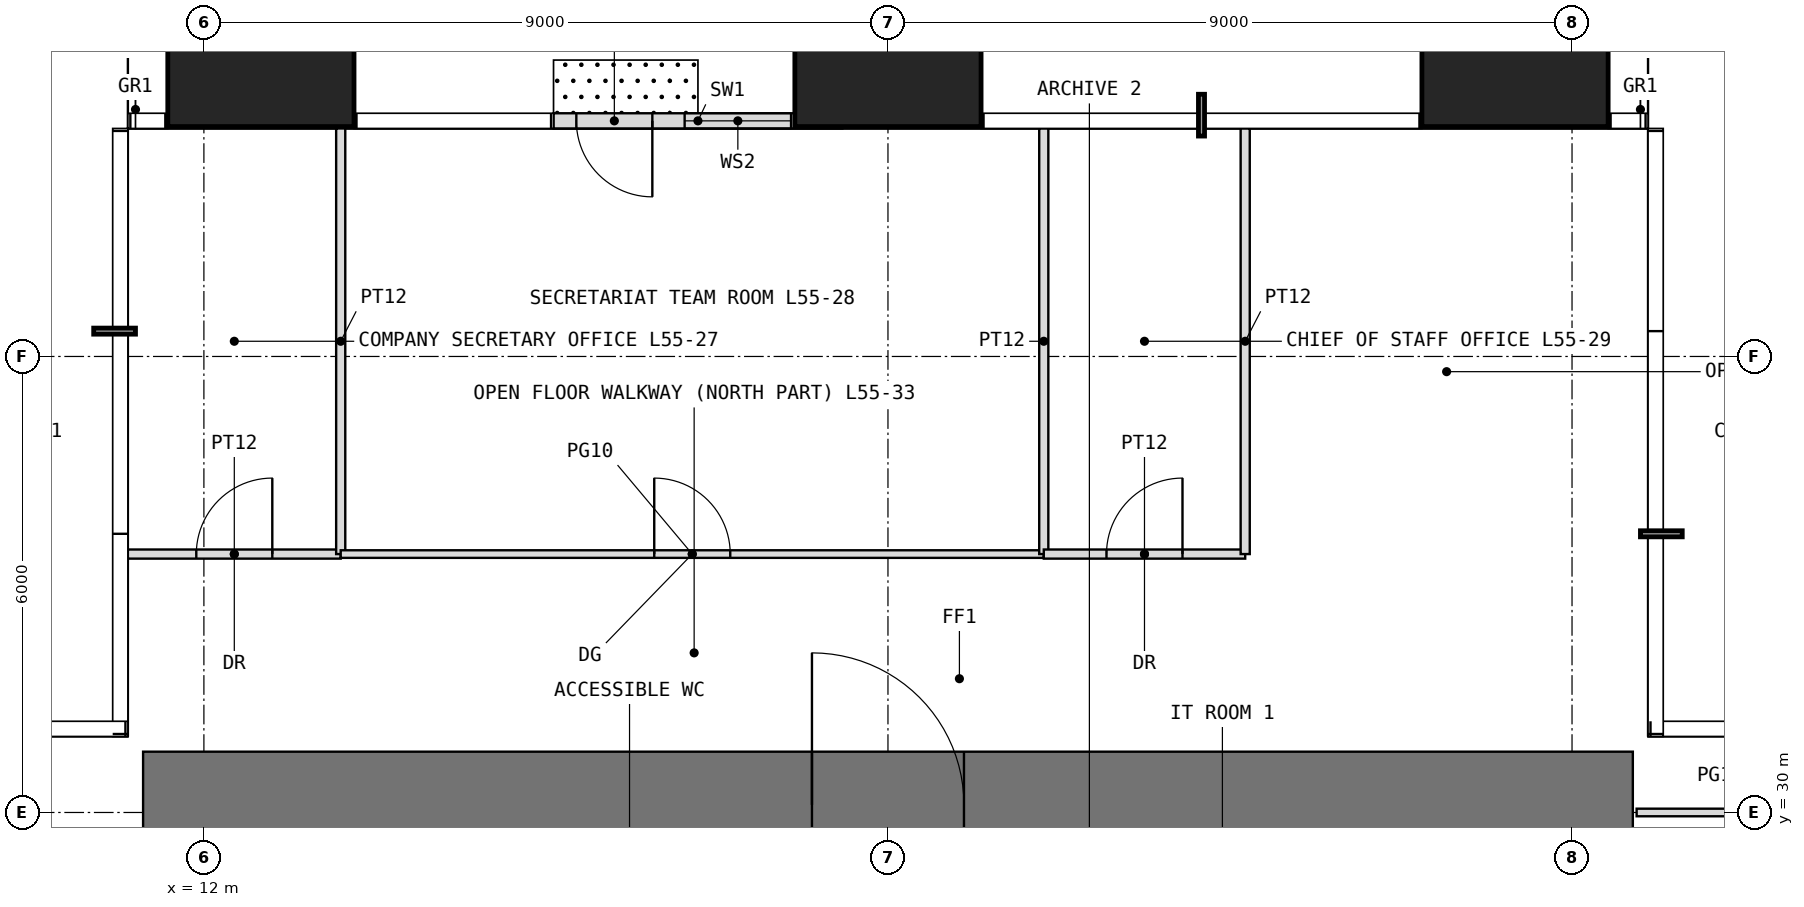
"""IFC4 building model, lengths in metres.
Left out: names, types, materials, properties, quantities, classifications, styles, units other than length and angle.
Written with IfcOpenShell. Run it as: python <this file> out.ifc"""

import sys

from ifc_helpers import new_model, si_unit, direction, frame, frame_2d, origin, origin_2d, place, context, subcontext, project, spatial, rectangle, extrude, element, fill, save


model = new_model("IFC4")
c1 = context("Model", 3, precision=1e-05, world=origin(), true_north=direction((0.0, 1.0)))
c2 = subcontext(c1, "Body", "Model", "MODEL_VIEW")
j1 = project(units=[si_unit("LENGTHUNIT", "METRE"), si_unit("PLANEANGLEUNIT", "RADIAN")], contexts=[c1])
p1 = place(None, origin())
s1 = spatial("IfcSite", under=j1, at=p1, CompositionType="ELEMENT")
p2 = place(p1, origin())
s2 = spatial("IfcBuilding", under=s1, at=p2, CompositionType="ELEMENT")
p3 = place(p2, frame((0.0, 0.0, 230.5)))
s3 = spatial("IfcBuildingStorey", under=s2, at=p3, CompositionType="ELEMENT", Elevation=230.5)
for number, where, z_axis, x_axis in (
    (1, (12.75, 40.25, 0.0), (0.0, 0.0, 1.0), (1.0, 0.0, 0.0)),
    (2, (21.0, 40.25, 0.0), (0.0, 0.0, 1.0), (1.0, 0.0, 0.0)),
    (3, (29.25, 40.25, 0.0), (0.0, 0.0, 1.0), (1.0, 0.0, 0.0)),
):
    element("IfcColumn", number, at=place(p3, frame(where, z_axis=z_axis, x_axis=x_axis)), inside=s3, PredefinedType="COLUMN", context=c2, shape_type="SweptSolid", body=[
        extrude(rectangle(XDim=2.45, YDim=2.45, at=origin_2d()), origin(), (0.0, 0.0, 1.0), 4.0),
    ])
p4 = place(p3, frame((20.4, 39.1, 0.0), z_axis=(0.0, 0.0, 1.0), x_axis=(-1.0, 0.0, 0.0)))
e4 = element("IfcWall", 4, at=p4, inside=s3, PredefinedType="USERDEFINED", context=c2, shape_type="SweptSolid", body=[
    extrude(rectangle(XDim=3.8, YDim=0.2, at=frame_2d((1.9, 0.0))), origin(), (0.0, 0.0, 1.0), 3.55),
])
p5 = place(p4, frame((2.5, 0.0, 0.0)))
e5 = element("IfcOpeningElement", 5, at=p5, cuts=e4, PredefinedType="OPENING", context=c2, shape_type="SweptSolid", body=[
    extrude(rectangle(XDim=1.0, YDim=2.4, at=frame_2d((0.5, 1.2))), frame((0.0, 0.11, 0.0), z_axis=(0.0, -1.0, 0.0), x_axis=(1.0, 0.0, 0.0)), (0.0, 0.0, 1.0), 0.22),
])
p6 = place(p4, frame((0.675, 0.0, 0.3)))
e6 = element("IfcOpeningElement", 6, at=p6, cuts=e4, PredefinedType="OPENING", context=c2, shape_type="SweptSolid", body=[
    extrude(rectangle(XDim=1.4, YDim=2.7, at=frame_2d((0.7, 1.35))), frame((0.0, 0.11, 0.0), z_axis=(0.0, -1.0, 0.0), x_axis=(1.0, 0.0, 0.0)), (0.0, 0.0, 1.0), 0.22),
])
p7 = place(p3, frame((11.2, 30.1, -0.05), z_axis=(0.0, 0.0, 1.0), x_axis=(1.0, 0.0, 0.0)))
e7 = element("IfcWall", 7, at=p7, inside=s3, PredefinedType="SHEAR", context=c2, shape_type="SweptSolid", body=[
    extrude(rectangle(XDim=19.6, YDim=1.4, at=frame_2d((9.8, 0.0))), origin(), (0.0, 0.0, 1.0), 3.8),
])
p8 = place(p7, frame((8.8, 0.0, 0.05)))
e8 = element("IfcOpeningElement", 8, at=p8, cuts=e7, PredefinedType="OPENING", context=c2, shape_type="SweptSolid", body=[
    extrude(rectangle(XDim=2.0, YDim=2.2, at=frame_2d((1.0, 1.1))), frame((0.0, 0.71, 0.0), z_axis=(0.0, -1.0, 0.0), x_axis=(1.0, 0.0, 0.0)), (0.0, 0.0, 1.0), 1.42),
])
p9 = place(p3, frame((11.0, 33.4, 0.0), z_axis=(0.0, 0.0, 1.0), x_axis=(1.0, 0.0, 0.0)))
e9 = element("IfcWall", 9, at=p9, inside=s3, PredefinedType="PARTITIONING", context=c2, shape_type="SweptSolid", body=[
    extrude(rectangle(XDim=2.8, YDim=0.12, at=frame_2d((1.4, 0.0))), origin(), (0.0, 0.0, 1.0), 3.55),
])
p10 = place(p9, frame((0.9, 0.0, 0.0)))
e10 = element("IfcOpeningElement", 10, at=p10, cuts=e9, PredefinedType="OPENING", context=c2, shape_type="SweptSolid", body=[
    extrude(rectangle(XDim=1.0, YDim=2.2, at=frame_2d((0.5, 1.1))), frame((0.0, 0.07, 0.0), z_axis=(0.0, -1.0, 0.0), x_axis=(1.0, 0.0, 0.0)), (0.0, 0.0, 1.0), 0.14),
])
p11 = place(p3, frame((13.8, 33.4, 0.0), z_axis=(0.0, 0.0, 1.0), x_axis=(0.0, 1.0, 0.0)))
e11 = element("IfcWall", 11, at=p11, inside=s3, PredefinedType="PARTITIONING", context=c2, shape_type="SweptSolid", body=[
    extrude(rectangle(XDim=5.6, YDim=0.12, at=frame_2d((2.8, 0.0))), origin(), (0.0, 0.0, 1.0), 3.55),
])
p12 = place(p3, frame((13.8, 33.4, 0.0), z_axis=(0.0, 0.0, 1.0), x_axis=(1.0, 0.0, 0.0)))
e12 = element("IfcWall", 12, at=p12, inside=s3, PredefinedType="PARTITIONING", context=c2, shape_type="SweptSolid", body=[
    extrude(rectangle(XDim=9.25, YDim=0.1, at=frame_2d((4.625, 0.0))), origin(), (0.0, 0.0, 1.0), 3.55),
])
p13 = place(p12, frame((4.125, 0.0, 0.0)))
e13 = element("IfcOpeningElement", 13, at=p13, cuts=e12, PredefinedType="OPENING", context=c2, shape_type="SweptSolid", body=[
    extrude(rectangle(XDim=1.0, YDim=2.4, at=frame_2d((0.5, 1.2))), frame((0.0, 0.06, 0.0), z_axis=(0.0, -1.0, 0.0), x_axis=(1.0, 0.0, 0.0)), (0.0, 0.0, 1.0), 0.12),
])
p14 = place(p3, frame((23.05, 33.4, 0.0), z_axis=(0.0, 0.0, 1.0), x_axis=(0.0, 1.0, 0.0)))
e14 = element("IfcWall", 14, at=p14, inside=s3, PredefinedType="PARTITIONING", context=c2, shape_type="SweptSolid", body=[
    extrude(rectangle(XDim=5.6, YDim=0.12, at=frame_2d((2.8, 0.0))), origin(), (0.0, 0.0, 1.0), 3.55),
])
p15 = place(p3, frame((23.05, 33.4, 0.0), z_axis=(0.0, 0.0, 1.0), x_axis=(1.0, 0.0, 0.0)))
e15 = element("IfcWall", 15, at=p15, inside=s3, PredefinedType="PARTITIONING", context=c2, shape_type="SweptSolid", body=[
    extrude(rectangle(XDim=2.65, YDim=0.12, at=frame_2d((1.325, 0.0))), origin(), (0.0, 0.0, 1.0), 3.55),
])
p16 = place(p15, frame((0.825, 0.0, 0.0)))
e16 = element("IfcOpeningElement", 16, at=p16, cuts=e15, PredefinedType="OPENING", context=c2, shape_type="SweptSolid", body=[
    extrude(rectangle(XDim=1.0, YDim=2.2, at=frame_2d((0.5, 1.1))), frame((0.0, 0.07, 0.0), z_axis=(0.0, -1.0, 0.0), x_axis=(1.0, 0.0, 0.0)), (0.0, 0.0, 1.0), 0.14),
])
p17 = place(p3, frame((25.7, 33.4, 0.0), z_axis=(0.0, 0.0, 1.0), x_axis=(0.0, 1.0, 0.0)))
e17 = element("IfcWall", 17, at=p17, inside=s3, PredefinedType="PARTITIONING", context=c2, shape_type="SweptSolid", body=[
    extrude(rectangle(XDim=5.6, YDim=0.12, at=frame_2d((2.8, 0.0))), origin(), (0.0, 0.0, 1.0), 3.55),
])
p18 = place(p3, frame((30.85, 30.0, 0.0), z_axis=(0.0, 0.0, 1.0), x_axis=(1.0, 0.0, 0.0)))
e18 = element("IfcWall", 18, at=p18, inside=s3, PredefinedType="PARTITIONING", context=c2, shape_type="SweptSolid", body=[
    extrude(rectangle(XDim=2.75, YDim=0.1, at=frame_2d((1.375, 0.0))), origin(), (0.0, 0.0, 1.0), 3.55),
])
p19 = place(p5, origin())
e19 = element("IfcDoor", 19, at=p19, inside=s3, OperationType="SINGLE_SWING_LEFT", PredefinedType="DOOR", context=c2, shape_type="SweptSolid", body=[
    extrude(rectangle(XDim=1.0, YDim=2.4, at=frame_2d((0.5, 1.2))), frame((0.0, 0.025, 0.0), z_axis=(0.0, -1.0, 0.0), x_axis=(1.0, 0.0, 0.0)), (0.0, 0.0, 1.0), 0.05),
])
fill(e5, e19)
p20 = place(p6, origin())
e20 = element("IfcWindow", 20, at=p20, inside=s3, PartitioningType="SINGLE_PANEL", PredefinedType="WINDOW", context=c2, shape_type="SweptSolid", body=[
    extrude(rectangle(XDim=1.4, YDim=2.7, at=frame_2d((0.7, 1.35))), frame((0.0, 0.03, 0.0), z_axis=(0.0, -1.0, 0.0), x_axis=(1.0, 0.0, 0.0)), (0.0, 0.0, 1.0), 0.06),
])
fill(e6, e20)
p21 = place(p8, origin())
e21 = element("IfcDoor", 21, at=p21, inside=s3, OperationType="DOUBLE_DOOR_SINGLE_SWING", PredefinedType="DOOR", context=c2, shape_type="SweptSolid", body=[
    extrude(rectangle(XDim=2.0, YDim=2.2, at=frame_2d((1.0, 1.1))), frame((0.0, 0.025, 0.0), z_axis=(0.0, -1.0, 0.0), x_axis=(1.0, 0.0, 0.0)), (0.0, 0.0, 1.0), 0.05),
])
fill(e8, e21)
p22 = place(p10, origin())
e22 = element("IfcDoor", 22, at=p22, inside=s3, OperationType="SINGLE_SWING_RIGHT", PredefinedType="DOOR", context=c2, shape_type="SweptSolid", body=[
    extrude(rectangle(XDim=1.0, YDim=2.2, at=frame_2d((0.5, 1.1))), frame((0.0, 0.025, 0.0), z_axis=(0.0, -1.0, 0.0), x_axis=(1.0, 0.0, 0.0)), (0.0, 0.0, 1.0), 0.05),
])
fill(e10, e22)
p23 = place(p13, origin())
e23 = element("IfcDoor", 23, at=p23, inside=s3, OperationType="SINGLE_SWING_LEFT", PredefinedType="DOOR", context=c2, shape_type="SweptSolid", body=[
    extrude(rectangle(XDim=1.0, YDim=2.4, at=frame_2d((0.5, 1.2))), frame((0.0, 0.025, 0.0), z_axis=(0.0, -1.0, 0.0), x_axis=(1.0, 0.0, 0.0)), (0.0, 0.0, 1.0), 0.05),
])
fill(e13, e23)
p24 = place(p16, origin())
e24 = element("IfcDoor", 24, at=p24, inside=s3, OperationType="SINGLE_SWING_RIGHT", PredefinedType="DOOR", context=c2, shape_type="SweptSolid", body=[
    extrude(rectangle(XDim=1.0, YDim=2.2, at=frame_2d((0.5, 1.1))), frame((0.0, 0.025, 0.0), z_axis=(0.0, -1.0, 0.0), x_axis=(1.0, 0.0, 0.0)), (0.0, 0.0, 1.0), 0.05),
])
fill(e16, e24)
save(model, sys.argv[1])
